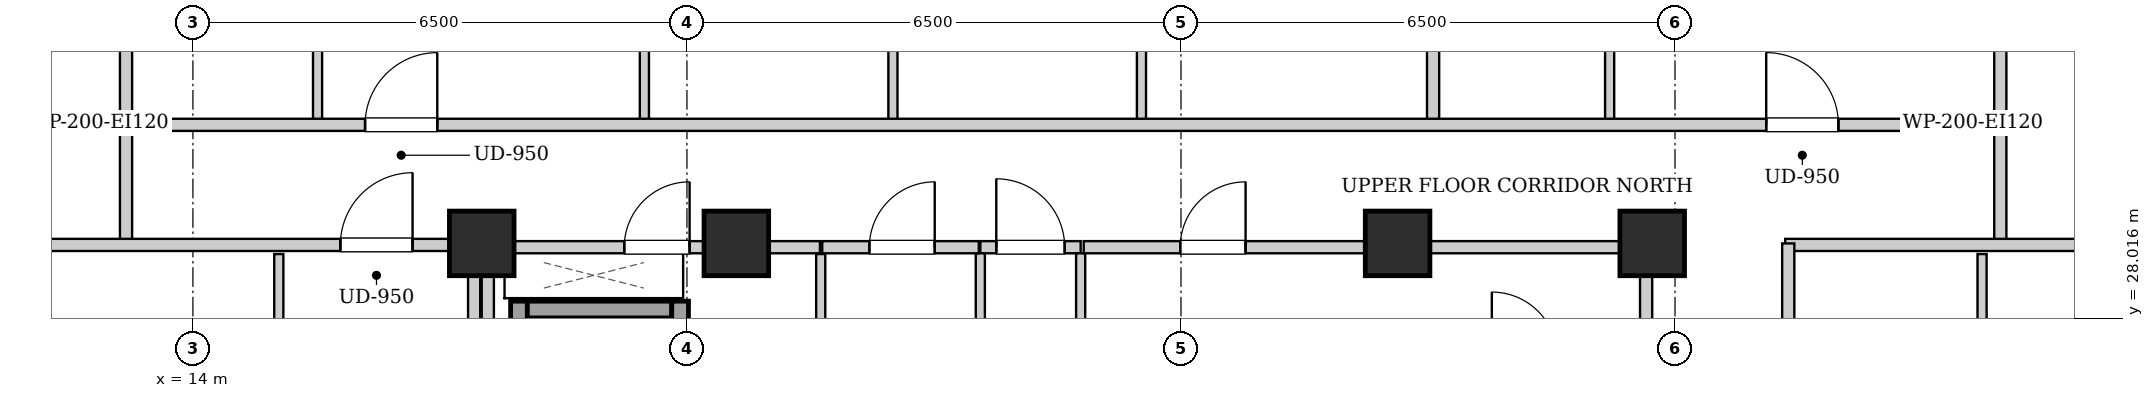
"""IFC4 building model, lengths in metres.
Left out: names, types, materials, properties, quantities, classifications, styles, units other than length and angle.
Written with IfcOpenShell. Run it as: python <this file> out.ifc"""

import sys

from ifc_helpers import new_model, si_unit, direction, frame, frame_2d, origin, origin_2d, place, context, subcontext, project, spatial, rectangle, extrude, element, fill, save


model = new_model("IFC4")
c1 = context("Model", 3, precision=1e-05, world=origin(), true_north=direction((0.0, 1.0)))
c2 = subcontext(c1, "Body", "Model", "MODEL_VIEW")
j1 = project(units=[si_unit("LENGTHUNIT", "METRE"), si_unit("PLANEANGLEUNIT", "RADIAN")], contexts=[c1])
p1 = place(None, origin())
s1 = spatial("IfcSite", under=j1, at=p1, CompositionType="ELEMENT")
p2 = place(p1, origin())
s2 = spatial("IfcBuilding", under=s1, at=p2, CompositionType="ELEMENT")
p3 = place(p2, frame((0.0, 0.0, 200.8)))
s3 = spatial("IfcBuildingStorey", under=s2, at=p3, CompositionType="ELEMENT", Elevation=200.8)
for number, where, z_axis, x_axis in (
    (1, (17.8, 29.0, 0.0), (0.0, 0.0, 1.0), (1.0, 0.0, 0.0)),
    (2, (21.15, 29.0, 0.0), (0.0, 0.0, 1.0), (1.0, 0.0, 0.0)),
    (3, (29.85, 29.0, 0.0), (0.0, 0.0, 1.0), (1.0, 0.0, 0.0)),
    (4, (33.2, 29.0, 0.0), (0.0, 0.0, 1.0), (1.0, 0.0, 0.0)),
):
    element("IfcColumn", number, at=place(p3, frame(where, z_axis=z_axis, x_axis=x_axis)), inside=s3, PredefinedType="COLUMN", context=c2, shape_type="SweptSolid", body=[
        extrude(rectangle(XDim=0.85, YDim=0.85, at=origin_2d()), origin(), (0.0, 0.0, 1.0), 3.3),
    ])
p4 = place(p3, frame((18.29, 24.1, 0.0), z_axis=(0.0, 0.0, 1.0), x_axis=(0.0, 1.0, 0.0)))
e5 = element("IfcWall", 5, at=p4, inside=s3, PredefinedType="SHEAR", context=c2, shape_type="SweptSolid", body=[
    extrude(rectangle(XDim=4.14, YDim=0.22, at=frame_2d((2.07, 0.0))), origin(), (0.0, 0.0, 1.0), 3.04),
])
p5 = place(p3, frame((18.4, 28.13, 0.0), z_axis=(0.0, 0.0, 1.0), x_axis=(1.0, 0.0, 0.0)))
e6 = element("IfcWall", 6, at=p5, inside=s3, PredefinedType="SHEAR", context=c2, shape_type="SweptSolid", body=[
    extrude(rectangle(XDim=1.9, YDim=0.22, at=frame_2d((0.95, 0.0))), origin(), (0.0, 0.0, 1.0), 3.04),
])
p6 = place(p3, frame((20.41, 26.06, 0.0), z_axis=(0.0, 0.0, 1.0), x_axis=(0.0, 1.0, 0.0)))
e7 = element("IfcWall", 7, at=p6, inside=s3, PredefinedType="SHEAR", context=c2, shape_type="SweptSolid", body=[
    extrude(rectangle(XDim=2.18, YDim=0.22, at=frame_2d((1.09, 0.0))), origin(), (0.0, 0.0, 1.0), 3.04),
])
p7 = place(p6, frame((0.54, 0.0, 0.0)))
e8 = element("IfcOpeningElement", 8, at=p7, cuts=e7, PredefinedType="OPENING", context=c2, shape_type="SweptSolid", body=[
    extrude(rectangle(XDim=1.1, YDim=2.15, at=frame_2d((0.55, 1.075))), frame((0.0, 0.12, 0.0), z_axis=(0.0, -1.0, 0.0), x_axis=(1.0, 0.0, 0.0)), (0.0, 0.0, 1.0), 0.24),
])
for number, where, z_axis, x_axis in (
    (9, (17.88, 24.12, 0.0), (0.0, 0.0, 1.0), (0.0, 1.0, 0.0)),
    (10, (33.12, 24.12, 0.0), (0.0, 0.0, 1.0), (0.0, 1.0, 0.0)),
):
    element("IfcWall", number, at=place(p3, frame(where, z_axis=z_axis, x_axis=x_axis)), inside=s3, PredefinedType="PARTITIONING", context=c2, shape_type="SweptSolid", body=[
        extrude(rectangle(XDim=4.76, YDim=0.16, at=frame_2d((2.38, 0.0))), origin(), (0.0, 0.0, 1.0), 3.04),
    ])
p8 = place(p3, frame((24.36, 28.95, 0.0), z_axis=(0.0, 0.0, 1.0), x_axis=(1.0, 0.0, 0.0)))
e11 = element("IfcWall", 11, at=p8, inside=s3, PredefinedType="PARTITIONING", context=c2, shape_type="SweptSolid", body=[
    extrude(rectangle(XDim=1.32, YDim=0.16, at=frame_2d((0.66, 0.0))), origin(), (0.0, 0.0, 1.0), 2.556),
])
p9 = place(p8, frame((0.21, 0.0, 0.0)))
e12 = element("IfcOpeningElement", 12, at=p9, cuts=e11, PredefinedType="OPENING", context=c2, shape_type="SweptSolid", body=[
    extrude(rectangle(XDim=0.9, YDim=2.05, at=frame_2d((0.45, 1.025))), frame((0.0, 0.09, 0.0), z_axis=(0.0, -1.0, 0.0), x_axis=(1.0, 0.0, 0.0)), (0.0, 0.0, 1.0), 0.18),
])
p10 = place(p3, frame((17.96, 28.95, 0.0), z_axis=(0.0, 0.0, 1.0), x_axis=(1.0, 0.0, 0.0)))
e13 = element("IfcWall", 13, at=p10, inside=s3, PredefinedType="PARTITIONING", context=c2, shape_type="SweptSolid", body=[
    extrude(rectangle(XDim=4.29, YDim=0.16, at=frame_2d((2.145, 0.0))), origin(), (0.0, 0.0, 1.0), 2.556),
])
p11 = place(p10, frame((1.715, 0.0, 0.0)))
e14 = element("IfcOpeningElement", 14, at=p11, cuts=e13, PredefinedType="OPENING", context=c2, shape_type="SweptSolid", body=[
    extrude(rectangle(XDim=0.86, YDim=2.05, at=frame_2d((0.43, 1.025))), frame((0.0, 0.09, 0.0), z_axis=(0.0, -1.0, 0.0), x_axis=(1.0, 0.0, 0.0)), (0.0, 0.0, 1.0), 0.18),
])
for number, where, z_axis, x_axis in (
    (15, (24.36, 25.0, 0.0), (0.0, 0.0, 1.0), (0.0, 1.0, 0.0)),
    (16, (25.68, 25.0, 0.0), (0.0, 0.0, 1.0), (0.0, 1.0, 0.0)),
):
    element("IfcWall", number, at=place(p3, frame(where, z_axis=z_axis, x_axis=x_axis)), inside=s3, PredefinedType="PARTITIONING", context=c2, shape_type="SweptSolid", body=[
        extrude(rectangle(XDim=3.87, YDim=0.12, at=frame_2d((1.935, 0.0))), origin(), (0.0, 0.0, 1.0), 3.04),
    ])
p12 = place(p3, frame((22.26, 25.0, 0.0), z_axis=(0.0, 0.0, 1.0), x_axis=(0.0, 1.0, 0.0)))
e17 = element("IfcWall", 17, at=p12, inside=s3, PredefinedType="PARTITIONING", context=c2, shape_type="SweptSolid", body=[
    extrude(rectangle(XDim=3.86, YDim=0.12, at=frame_2d((1.93, 0.0))), origin(), (0.0, 0.0, 1.0), 3.04),
])
p13 = place(p3, frame((22.28, 28.95, 0.0), z_axis=(0.0, 0.0, 1.0), x_axis=(1.0, 0.0, 0.0)))
e18 = element("IfcWall", 18, at=p13, inside=s3, PredefinedType="PARTITIONING", context=c2, shape_type="SweptSolid", body=[
    extrude(rectangle(XDim=2.06, YDim=0.16, at=frame_2d((1.03, 0.0))), origin(), (0.0, 0.0, 1.0), 2.556),
])
p14 = place(p13, frame((0.62, 0.0, 0.0)))
e19 = element("IfcOpeningElement", 19, at=p14, cuts=e18, PredefinedType="OPENING", context=c2, shape_type="SweptSolid", body=[
    extrude(rectangle(XDim=0.86, YDim=2.05, at=frame_2d((0.43, 1.025))), frame((0.0, 0.09, 0.0), z_axis=(0.0, -1.0, 0.0), x_axis=(1.0, 0.0, 0.0)), (0.0, 0.0, 1.0), 0.18),
])
p15 = place(p3, frame((25.72, 28.95, 0.0), z_axis=(0.0, 0.0, 1.0), x_axis=(1.0, 0.0, 0.0)))
e20 = element("IfcWall", 20, at=p15, inside=s3, PredefinedType="PARTITIONING", context=c2, shape_type="SweptSolid", body=[
    extrude(rectangle(XDim=7.32, YDim=0.16, at=frame_2d((3.66, 0.0))), origin(), (0.0, 0.0, 1.0), 2.556),
])
p16 = place(p15, frame((1.27, 0.0, 0.0)))
e21 = element("IfcOpeningElement", 21, at=p16, cuts=e20, PredefinedType="OPENING", context=c2, shape_type="SweptSolid", body=[
    extrude(rectangle(XDim=0.86, YDim=2.05, at=frame_2d((0.43, 1.025))), frame((0.0, 0.09, 0.0), z_axis=(0.0, -1.0, 0.0), x_axis=(1.0, 0.0, 0.0)), (0.0, 0.0, 1.0), 0.18),
])
for number, where, z_axis, x_axis in (
    (22, (13.12, 28.98, 0.0), (0.0, 0.0, 1.0), (0.0, 1.0, 0.0)),
    (23, (37.78, 28.98, 0.0), (0.0, 0.0, 1.0), (0.0, 1.0, 0.0)),
):
    element("IfcWall", number, at=place(p3, frame(where, z_axis=z_axis, x_axis=x_axis)), inside=s3, PredefinedType="PARTITIONING", context=c2, shape_type="SweptSolid", body=[
        extrude(rectangle(XDim=1.58, YDim=0.16, at=frame_2d((0.79, 0.0))), origin(), (0.0, 0.0, 1.0), 3.04),
    ])
p17 = place(p3, frame((34.95, 28.98, 0.0), z_axis=(0.0, 0.0, 1.0), x_axis=(1.0, 0.0, 0.0)))
e24 = element("IfcWall", 24, at=p17, inside=s3, PredefinedType="PARTITIONING", context=c2, shape_type="SweptSolid", body=[
    extrude(rectangle(XDim=5.07, YDim=0.16, at=frame_2d((2.535, 0.0))), origin(), (0.0, 0.0, 1.0), 2.556),
])
p18 = place(p3, frame((13.12, 30.6, 0.0), z_axis=(0.0, 0.0, 1.0), x_axis=(0.0, 1.0, 0.0)))
e25 = element("IfcWall", 25, at=p18, inside=s3, PredefinedType="PARTITIONING", context=c2, shape_type="SweptSolid", body=[
    extrude(rectangle(XDim=2.91, YDim=0.16, at=frame_2d((1.455, 0.0))), origin(), (0.0, 0.0, 1.0), 3.04),
])
p19 = place(p3, frame((15.64, 30.6, 0.0), z_axis=(0.0, 0.0, 1.0), x_axis=(0.0, 1.0, 0.0)))
e26 = element("IfcWall", 26, at=p19, inside=s3, PredefinedType="PARTITIONING", context=c2, shape_type="SweptSolid", body=[
    extrude(rectangle(XDim=2.85, YDim=0.12, at=frame_2d((1.425, 0.0))), origin(), (0.0, 0.0, 1.0), 3.04),
])
p20 = place(p19, frame((0.995, 0.0, 0.0)))
e27 = element("IfcOpeningElement", 27, at=p20, cuts=e26, PredefinedType="OPENING", context=c2, shape_type="SweptSolid", body=[
    extrude(rectangle(XDim=0.86, YDim=2.05, at=frame_2d((0.43, 1.025))), frame((0.0, 0.07, 0.0), z_axis=(0.0, -1.0, 0.0), x_axis=(1.0, 0.0, 0.0)), (0.0, 0.0, 1.0), 0.14),
])
p21 = place(p3, frame((19.94, 30.6, 0.0), z_axis=(0.0, 0.0, 1.0), x_axis=(0.0, 1.0, 0.0)))
e28 = element("IfcWall", 28, at=p21, inside=s3, PredefinedType="PARTITIONING", context=c2, shape_type="SweptSolid", body=[
    extrude(rectangle(XDim=2.85, YDim=0.12, at=frame_2d((1.425, 0.0))), origin(), (0.0, 0.0, 1.0), 3.04),
])
p22 = place(p21, frame((0.975, 0.0, 0.0)))
e29 = element("IfcOpeningElement", 29, at=p22, cuts=e28, PredefinedType="OPENING", context=c2, shape_type="SweptSolid", body=[
    extrude(rectangle(XDim=0.9, YDim=2.05, at=frame_2d((0.45, 1.025))), frame((0.0, 0.07, 0.0), z_axis=(0.0, -1.0, 0.0), x_axis=(1.0, 0.0, 0.0)), (0.0, 0.0, 1.0), 0.14),
])
p23 = place(p3, frame((23.21, 30.6, 0.0), z_axis=(0.0, 0.0, 1.0), x_axis=(0.0, 1.0, 0.0)))
e30 = element("IfcWall", 30, at=p23, inside=s3, PredefinedType="PARTITIONING", context=c2, shape_type="SweptSolid", body=[
    extrude(rectangle(XDim=2.85, YDim=0.12, at=frame_2d((1.425, 0.0))), origin(), (0.0, 0.0, 1.0), 3.04),
])
p24 = place(p23, frame((0.975, 0.0, 0.0)))
e31 = element("IfcOpeningElement", 31, at=p24, cuts=e30, PredefinedType="OPENING", context=c2, shape_type="SweptSolid", body=[
    extrude(rectangle(XDim=0.9, YDim=2.05, at=frame_2d((0.45, 1.025))), frame((0.0, 0.07, 0.0), z_axis=(0.0, -1.0, 0.0), x_axis=(1.0, 0.0, 0.0)), (0.0, 0.0, 1.0), 0.14),
])
p25 = place(p3, frame((26.48, 30.6, 0.0), z_axis=(0.0, 0.0, 1.0), x_axis=(0.0, 1.0, 0.0)))
e32 = element("IfcWall", 32, at=p25, inside=s3, PredefinedType="PARTITIONING", context=c2, shape_type="SweptSolid", body=[
    extrude(rectangle(XDim=2.85, YDim=0.12, at=frame_2d((1.425, 0.0))), origin(), (0.0, 0.0, 1.0), 3.04),
])
p26 = place(p25, frame((0.975, 0.0, 0.0)))
e33 = element("IfcOpeningElement", 33, at=p26, cuts=e32, PredefinedType="OPENING", context=c2, shape_type="SweptSolid", body=[
    extrude(rectangle(XDim=0.9, YDim=2.05, at=frame_2d((0.45, 1.025))), frame((0.0, 0.07, 0.0), z_axis=(0.0, -1.0, 0.0), x_axis=(1.0, 0.0, 0.0)), (0.0, 0.0, 1.0), 0.14),
])
p27 = place(p3, frame((37.78, 30.6, 0.0), z_axis=(0.0, 0.0, 1.0), x_axis=(0.0, 1.0, 0.0)))
e34 = element("IfcWall", 34, at=p27, inside=s3, PredefinedType="PARTITIONING", context=c2, shape_type="SweptSolid", body=[
    extrude(rectangle(XDim=2.91, YDim=0.16, at=frame_2d((1.455, 0.0))), origin(), (0.0, 0.0, 1.0), 3.04),
])
p28 = place(p3, frame((30.317, 30.6, 0.0), z_axis=(0.0, 0.0, 1.0), x_axis=(0.0, 1.0, 0.0)))
e35 = element("IfcWall", 35, at=p28, inside=s3, PredefinedType="PARTITIONING", context=c2, shape_type="SweptSolid", body=[
    extrude(rectangle(XDim=9.32, YDim=0.16, at=frame_2d((4.66, 0.0))), origin(), (0.0, 0.0, 1.0), 3.04),
])
p29 = place(p3, frame((32.64, 30.6, 0.0), z_axis=(0.0, 0.0, 1.0), x_axis=(0.0, 1.0, 0.0)))
e36 = element("IfcWall", 36, at=p29, inside=s3, PredefinedType="PARTITIONING", context=c2, shape_type="SweptSolid", body=[
    extrude(rectangle(XDim=2.85, YDim=0.12, at=frame_2d((1.425, 0.0))), origin(), (0.0, 0.0, 1.0), 3.04),
])
p30 = place(p29, frame((0.995, 0.0, 0.0)))
e37 = element("IfcOpeningElement", 37, at=p30, cuts=e36, PredefinedType="OPENING", context=c2, shape_type="SweptSolid", body=[
    extrude(rectangle(XDim=0.86, YDim=2.05, at=frame_2d((0.43, 1.025))), frame((0.0, 0.07, 0.0), z_axis=(0.0, -1.0, 0.0), x_axis=(1.0, 0.0, 0.0)), (0.0, 0.0, 1.0), 0.14),
])
p31 = place(p3, frame((10.88, 28.98, 0.0), z_axis=(0.0, 0.0, 1.0), x_axis=(1.0, 0.0, 0.0)))
e38 = element("IfcWall", 38, at=p31, inside=s3, PredefinedType="PARTITIONING", context=c2, shape_type="SweptSolid", body=[
    extrude(rectangle(XDim=6.88, YDim=0.16, at=frame_2d((3.44, 0.0))), origin(), (0.0, 0.0, 1.0), 2.556),
])
p32 = place(p31, frame((5.06, 0.0, 0.0)))
e39 = element("IfcOpeningElement", 39, at=p32, cuts=e38, PredefinedType="OPENING", context=c2, shape_type="SweptSolid", body=[
    extrude(rectangle(XDim=0.95, YDim=2.1, at=frame_2d((0.475, 1.05))), frame((0.0, 0.09, 0.0), z_axis=(0.0, -1.0, 0.0), x_axis=(1.0, 0.0, 0.0)), (0.0, 0.0, 1.0), 0.18),
])
p33 = place(p3, frame((15.13, 25.052, 0.0), z_axis=(0.0, 0.0, 1.0), x_axis=(0.0, 1.0, 0.0)))
e40 = element("IfcWall", 40, at=p33, inside=s3, PredefinedType="PARTITIONING", context=c2, shape_type="SweptSolid", body=[
    extrude(rectangle(XDim=3.808, YDim=0.12, at=frame_2d((1.904, 0.0))), origin(), (0.0, 0.0, 1.0), 3.04),
])
p34 = place(p33, frame((1.454, 0.0, 0.0)))
e41 = element("IfcOpeningElement", 41, at=p34, cuts=e40, PredefinedType="OPENING", context=c2, shape_type="SweptSolid", body=[
    extrude(rectangle(XDim=0.9, YDim=2.05, at=frame_2d((0.45, 1.025))), frame((0.0, 0.07, 0.0), z_axis=(0.0, -1.0, 0.0), x_axis=(1.0, 0.0, 0.0)), (0.0, 0.0, 1.0), 0.14),
])
p35 = place(p3, frame((37.54, 24.552, 0.0), z_axis=(0.0, 0.0, 1.0), x_axis=(0.0, 1.0, 0.0)))
e42 = element("IfcWall", 42, at=p35, inside=s3, PredefinedType="PARTITIONING", context=c2, shape_type="SweptSolid", body=[
    extrude(rectangle(XDim=4.308, YDim=0.12, at=frame_2d((2.154, 0.0))), origin(), (0.0, 0.0, 1.0), 3.04),
])
p36 = place(p35, frame((1.704, 0.0, 0.0)))
e43 = element("IfcOpeningElement", 43, at=p36, cuts=e42, PredefinedType="OPENING", context=c2, shape_type="SweptSolid", body=[
    extrude(rectangle(XDim=0.9, YDim=2.05, at=frame_2d((0.45, 1.025))), frame((0.0, 0.07, 0.0), z_axis=(0.0, -1.0, 0.0), x_axis=(1.0, 0.0, 0.0)), (0.0, 0.0, 1.0), 0.14),
])
p37 = place(p3, frame((13.15, 30.56, 0.0), z_axis=(0.0, 0.0, 1.0), x_axis=(1.0, 0.0, 0.0)))
e44 = element("IfcWall", 44, at=p37, inside=s3, PredefinedType="PARTITIONING", context=c2, shape_type="SweptSolid", body=[
    extrude(rectangle(XDim=24.6, YDim=0.16, at=frame_2d((12.3, 0.0))), origin(), (0.0, 0.0, 1.0), 3.04),
])
p38 = place(p37, frame((3.115, 0.0, 0.0)))
e45 = element("IfcOpeningElement", 45, at=p38, cuts=e44, PredefinedType="OPENING", context=c2, shape_type="SweptSolid", body=[
    extrude(rectangle(XDim=0.95, YDim=2.1, at=frame_2d((0.475, 1.05))), frame((0.0, 0.09, 0.0), z_axis=(0.0, -1.0, 0.0), x_axis=(1.0, 0.0, 0.0)), (0.0, 0.0, 1.0), 0.18),
])
p39 = place(p37, frame((21.55, 0.0, 0.0)))
e46 = element("IfcOpeningElement", 46, at=p39, cuts=e44, PredefinedType="OPENING", context=c2, shape_type="SweptSolid", body=[
    extrude(rectangle(XDim=0.95, YDim=2.1, at=frame_2d((0.475, 1.05))), frame((0.0, 0.09, 0.0), z_axis=(0.0, -1.0, 0.0), x_axis=(1.0, 0.0, 0.0)), (0.0, 0.0, 1.0), 0.18),
])
p40 = place(p3, frame((17.7, 15.02, 0.0), z_axis=(0.0, 0.0, 1.0), x_axis=(0.0, 1.0, 0.0)))
e47 = element("IfcWall", 47, at=p40, inside=s3, PredefinedType="PARTITIONING", context=c2, shape_type="SweptSolid", body=[
    extrude(rectangle(XDim=13.98, YDim=0.16, at=frame_2d((6.99, 0.0))), origin(), (0.0, 0.0, 1.0), 3.04),
])
p41 = place(p3, frame((34.99, 15.07, 0.0), z_axis=(0.0, 0.0, 1.0), x_axis=(0.0, 1.0, 0.0)))
e48 = element("IfcWall", 48, at=p41, inside=s3, PredefinedType="PARTITIONING", context=c2, shape_type="SweptSolid", body=[
    extrude(rectangle(XDim=13.93, YDim=0.16, at=frame_2d((6.965, 0.0))), origin(), (0.0, 0.0, 1.0), 3.04),
])
p42 = place(p41, frame((4.385, 0.0, 0.0)))
e49 = element("IfcOpeningElement", 49, at=p42, cuts=e48, PredefinedType="OPENING", context=c2, shape_type="SweptSolid", body=[
    extrude(rectangle(XDim=0.95, YDim=2.1, at=frame_2d((0.475, 1.05))), frame((0.0, 0.09, 0.0), z_axis=(0.0, -1.0, 0.0), x_axis=(1.0, 0.0, 0.0)), (0.0, 0.0, 1.0), 0.18),
])
p43 = place(p9, origin())
e50 = element("IfcDoor", 50, at=p43, inside=s3, OperationType="SINGLE_SWING_LEFT", PredefinedType="DOOR", context=c2, shape_type="SweptSolid", body=[
    extrude(rectangle(XDim=0.9, YDim=2.05, at=frame_2d((0.45, 1.025))), frame((0.0, 0.025, 0.0), z_axis=(0.0, -1.0, 0.0), x_axis=(1.0, 0.0, 0.0)), (0.0, 0.0, 1.0), 0.05),
])
fill(e12, e50)
p44 = place(p11, origin())
e51 = element("IfcDoor", 51, at=p44, inside=s3, OperationType="SINGLE_SWING_RIGHT", PredefinedType="DOOR", context=c2, shape_type="SweptSolid", body=[
    extrude(rectangle(XDim=0.86, YDim=2.05, at=frame_2d((0.43, 1.025))), frame((0.0, 0.025, 0.0), z_axis=(0.0, -1.0, 0.0), x_axis=(1.0, 0.0, 0.0)), (0.0, 0.0, 1.0), 0.05),
])
fill(e14, e51)
p45 = place(p14, origin())
e52 = element("IfcDoor", 52, at=p45, inside=s3, OperationType="SINGLE_SWING_RIGHT", PredefinedType="DOOR", context=c2, shape_type="SweptSolid", body=[
    extrude(rectangle(XDim=0.86, YDim=2.05, at=frame_2d((0.43, 1.025))), frame((0.0, 0.025, 0.0), z_axis=(0.0, -1.0, 0.0), x_axis=(1.0, 0.0, 0.0)), (0.0, 0.0, 1.0), 0.05),
])
fill(e19, e52)
p46 = place(p16, origin())
e53 = element("IfcDoor", 53, at=p46, inside=s3, OperationType="SINGLE_SWING_RIGHT", PredefinedType="DOOR", context=c2, shape_type="SweptSolid", body=[
    extrude(rectangle(XDim=0.86, YDim=2.05, at=frame_2d((0.43, 1.025))), frame((0.0, 0.025, 0.0), z_axis=(0.0, -1.0, 0.0), x_axis=(1.0, 0.0, 0.0)), (0.0, 0.0, 1.0), 0.05),
])
fill(e21, e53)
p47 = place(p32, origin())
e54 = element("IfcDoor", 54, at=p47, inside=s3, OperationType="SINGLE_SWING_RIGHT", PredefinedType="DOOR", context=c2, shape_type="SweptSolid", body=[
    extrude(rectangle(XDim=0.95, YDim=2.1, at=frame_2d((0.475, 1.05))), frame((0.0, 0.025, 0.0), z_axis=(0.0, -1.0, 0.0), x_axis=(1.0, 0.0, 0.0)), (0.0, 0.0, 1.0), 0.05),
])
fill(e39, e54)
p48 = place(p38, origin())
e55 = element("IfcDoor", 55, at=p48, inside=s3, OperationType="SINGLE_SWING_RIGHT", PredefinedType="DOOR", context=c2, shape_type="SweptSolid", body=[
    extrude(rectangle(XDim=0.95, YDim=2.1, at=frame_2d((0.475, 1.05))), frame((0.0, 0.025, 0.0), z_axis=(0.0, -1.0, 0.0), x_axis=(1.0, 0.0, 0.0)), (0.0, 0.0, 1.0), 0.05),
])
fill(e45, e55)
p49 = place(p39, origin())
e56 = element("IfcDoor", 56, at=p49, inside=s3, OperationType="SINGLE_SWING_LEFT", PredefinedType="DOOR", context=c2, shape_type="SweptSolid", body=[
    extrude(rectangle(XDim=0.95, YDim=2.1, at=frame_2d((0.475, 1.05))), frame((0.0, 0.025, 0.0), z_axis=(0.0, -1.0, 0.0), x_axis=(1.0, 0.0, 0.0)), (0.0, 0.0, 1.0), 0.05),
])
fill(e46, e56)
save(model, sys.argv[1])
